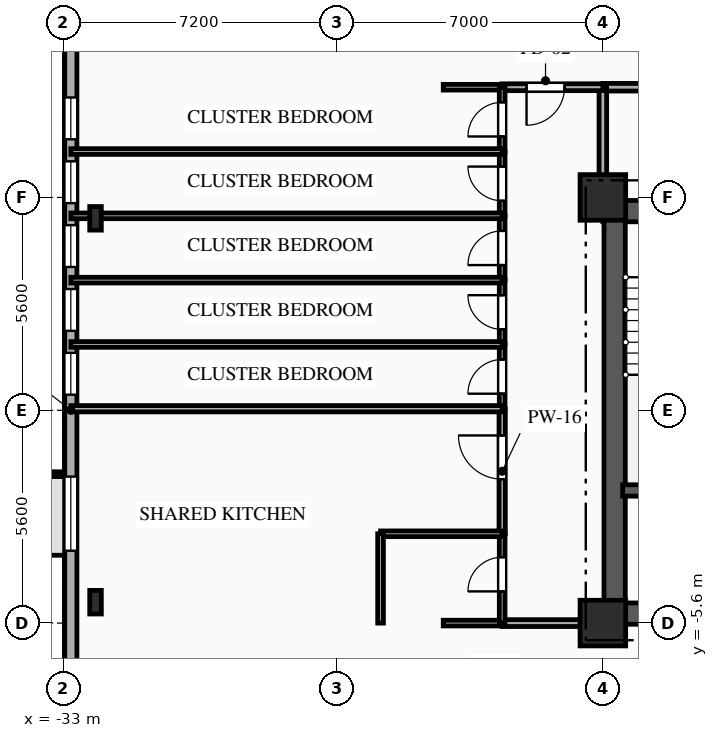
"""IFC4 building model, lengths in metres.
Left out: names, types, materials, properties, quantities, classifications, styles, units other than length and angle.
Written with IfcOpenShell. Run it as: python <this file> out.ifc"""

import sys

from ifc_helpers import new_model, si_unit, direction, frame, frame_2d, origin, origin_2d, place, context, subcontext, project, spatial, rectangle, i_section, extrude, element, fill, save


model = new_model("IFC4")
c1 = context("Model", 3, precision=1e-05, world=origin(), true_north=direction((0.0, 1.0)))
c2 = subcontext(c1, "Body", "Model", "MODEL_VIEW")
j1 = project(units=[si_unit("LENGTHUNIT", "METRE"), si_unit("PLANEANGLEUNIT", "RADIAN")], contexts=[c1])
p1 = place(None, origin())
s1 = spatial("IfcSite", under=j1, at=p1, CompositionType="ELEMENT")
p2 = place(p1, origin())
s2 = spatial("IfcBuilding", under=s1, at=p2, CompositionType="ELEMENT")
p3 = place(p2, frame((0.0, 0.0, 37.05)))
s3 = spatial("IfcBuildingStorey", under=s2, at=p3, CompositionType="ELEMENT", Elevation=37.05)
for number, where, z_axis, x_axis in (
    (1, (-18.8, -5.6, 0.0), (0.0, 0.0, 1.0), (1.0, 0.0, 0.0)),
    (2, (-18.8, 5.6, 0.0), (0.0, 0.0, 1.0), (1.0, 0.0, 0.0)),
):
    element("IfcColumn", number, at=place(p3, frame(where, z_axis=z_axis, x_axis=x_axis)), inside=s3, PredefinedType="COLUMN", context=c2, shape_type="SweptSolid", body=[
        extrude(rectangle(XDim=1.2, YDim=1.2, at=origin_2d()), origin(), (0.0, 0.0, 1.0), 3.35),
    ])
for number, where, z_axis, x_axis in (
    (3, (-32.15, 5.05, 0.0), (0.0, 0.0, 1.0), (1.0, 0.0, 0.0)),
    (4, (-32.15, -5.05, 0.0), (0.0, 0.0, 1.0), (1.0, 0.0, 0.0)),
):
    element("IfcColumn", number, at=place(p3, frame(where, z_axis=z_axis, x_axis=x_axis)), inside=s3, PredefinedType="COLUMN", context=c2, shape_type="SweptSolid", body=[
        extrude(i_section(OverallWidth=0.305, OverallDepth=0.62, WebThickness=0.021, FlangeThickness=0.04, FilletRadius=0.027, at=origin_2d()), origin(), (0.0, 0.0, 1.0), 3.35),
    ])
p4 = place(p3, frame((-32.8, -15.8, 0.0), z_axis=(0.0, 0.0, 1.0), x_axis=(0.0, 1.0, 0.0)))
e5 = element("IfcWall", 5, at=p4, inside=s3, PredefinedType="SOLIDWALL", context=c2, shape_type="SweptSolid", body=[
    extrude(rectangle(XDim=31.6, YDim=0.32, at=frame_2d((15.8, 0.0))), origin(), (0.0, 0.0, 1.0), 3.035),
])
p5 = place(p4, frame((12.105, 0.0, 0.85)))
e6 = element("IfcOpeningElement", 6, at=p5, cuts=e5, PredefinedType="OPENING", context=c2, shape_type="SweptSolid", body=[
    extrude(rectangle(XDim=1.95, YDim=1.85, at=frame_2d((0.975, 0.925))), frame((0.0, 0.17, 0.0), z_axis=(0.0, -1.0, 0.0), x_axis=(1.0, 0.0, 0.0)), (0.0, 0.0, 1.0), 0.34),
])
p6 = place(p4, frame((16.21, 0.0, 0.85)))
e7 = element("IfcOpeningElement", 7, at=p6, cuts=e5, PredefinedType="OPENING", context=c2, shape_type="SweptSolid", body=[
    extrude(rectangle(XDim=1.1, YDim=1.85, at=frame_2d((0.55, 0.925))), frame((0.0, 0.17, 0.0), z_axis=(0.0, -1.0, 0.0), x_axis=(1.0, 0.0, 0.0)), (0.0, 0.0, 1.0), 0.34),
])
p7 = place(p4, frame((17.89, 0.0, 0.85)))
e8 = element("IfcOpeningElement", 8, at=p7, cuts=e5, PredefinedType="OPENING", context=c2, shape_type="SweptSolid", body=[
    extrude(rectangle(XDim=1.1, YDim=1.85, at=frame_2d((0.55, 0.925))), frame((0.0, 0.17, 0.0), z_axis=(0.0, -1.0, 0.0), x_axis=(1.0, 0.0, 0.0)), (0.0, 0.0, 1.0), 0.34),
])
p8 = place(p4, frame((19.57, 0.0, 0.85)))
e9 = element("IfcOpeningElement", 9, at=p8, cuts=e5, PredefinedType="OPENING", context=c2, shape_type="SweptSolid", body=[
    extrude(rectangle(XDim=1.1, YDim=1.85, at=frame_2d((0.55, 0.925))), frame((0.0, 0.17, 0.0), z_axis=(0.0, -1.0, 0.0), x_axis=(1.0, 0.0, 0.0)), (0.0, 0.0, 1.0), 0.34),
])
p9 = place(p4, frame((21.25, 0.0, 0.85)))
e10 = element("IfcOpeningElement", 10, at=p9, cuts=e5, PredefinedType="OPENING", context=c2, shape_type="SweptSolid", body=[
    extrude(rectangle(XDim=1.1, YDim=1.85, at=frame_2d((0.55, 0.925))), frame((0.0, 0.17, 0.0), z_axis=(0.0, -1.0, 0.0), x_axis=(1.0, 0.0, 0.0)), (0.0, 0.0, 1.0), 0.34),
])
p10 = place(p4, frame((22.93, 0.0, 0.85)))
e11 = element("IfcOpeningElement", 11, at=p10, cuts=e5, PredefinedType="OPENING", context=c2, shape_type="SweptSolid", body=[
    extrude(rectangle(XDim=1.1, YDim=1.85, at=frame_2d((0.55, 0.925))), frame((0.0, 0.17, 0.0), z_axis=(0.0, -1.0, 0.0), x_axis=(1.0, 0.0, 0.0)), (0.0, 0.0, 1.0), 0.34),
])
p11 = place(p3, frame((-18.8, 5.24, 0.0), z_axis=(0.0, 0.0, 1.0), x_axis=(1.0, 0.0, 0.0)))
e12 = element("IfcWall", 12, at=p11, inside=s3, PredefinedType="SHEAR", context=c2, shape_type="SweptSolid", body=[
    extrude(rectangle(XDim=9.6, YDim=0.56, at=frame_2d((4.8, 0.0))), origin(), (0.0, 0.0, 1.0), 3.035),
])
p12 = place(p11, frame((1.55, 0.0, 0.0)))
e13 = element("IfcOpeningElement", 13, at=p12, cuts=e12, PredefinedType="OPENING", context=c2, shape_type="SweptSolid", body=[
    extrude(rectangle(XDim=1.1, YDim=2.15, at=frame_2d((0.55, 1.075))), frame((0.0, 0.29, 0.0), z_axis=(0.0, -1.0, 0.0), x_axis=(1.0, 0.0, 0.0)), (0.0, 0.0, 1.0), 0.58),
])
p13 = place(p11, frame((4.775, 0.0, 0.0)))
e14 = element("IfcOpeningElement", 14, at=p13, cuts=e12, PredefinedType="OPENING", context=c2, shape_type="SweptSolid", body=[
    extrude(rectangle(XDim=1.05, YDim=2.1, at=frame_2d((0.525, 1.05))), frame((0.0, 0.29, 0.0), z_axis=(0.0, -1.0, 0.0), x_axis=(1.0, 0.0, 0.0)), (0.0, 0.0, 1.0), 0.58),
])
p14 = place(p3, frame((-18.8, -5.35, 0.0), z_axis=(0.0, 0.0, 1.0), x_axis=(1.0, 0.0, 0.0)))
e15 = element("IfcWall", 15, at=p14, inside=s3, PredefinedType="SHEAR", context=c2, shape_type="SweptSolid", body=[
    extrude(rectangle(XDim=9.6, YDim=0.56, at=frame_2d((4.8, 0.0))), origin(), (0.0, 0.0, 1.0), 3.035),
])
p15 = place(p14, frame((1.05, 0.0, 0.0)))
e16 = element("IfcOpeningElement", 16, at=p15, cuts=e15, PredefinedType="OPENING", context=c2, shape_type="SweptSolid", body=[
    extrude(rectangle(XDim=0.9, YDim=2.1, at=frame_2d((0.45, 1.05))), frame((0.0, 0.29, 0.0), z_axis=(0.0, -1.0, 0.0), x_axis=(1.0, 0.0, 0.0)), (0.0, 0.0, 1.0), 0.58),
])
p16 = place(p3, frame((-18.49, -5.05, 0.0), z_axis=(0.0, 0.0, 1.0), x_axis=(0.0, 1.0, 0.0)))
e17 = element("IfcWall", 17, at=p16, inside=s3, PredefinedType="SHEAR", context=c2, shape_type="SweptSolid", body=[
    extrude(rectangle(XDim=10.1, YDim=0.56, at=frame_2d((5.05, 0.0))), origin(), (0.0, 0.0, 1.0), 3.035),
])
p17 = place(p3, frame((-18.28, -2.11, 0.0), z_axis=(0.0, 0.0, 1.0), x_axis=(1.0, 0.0, 0.0)))
e18 = element("IfcWall", 18, at=p17, inside=s3, PredefinedType="SHEAR", context=c2, shape_type="SweptSolid", body=[
    extrude(rectangle(XDim=3.18, YDim=0.3, at=frame_2d((1.59, 0.0))), origin(), (0.0, 0.0, 1.0), 3.035),
])
p18 = place(p3, frame((-12.0, 8.5, 0.0), z_axis=(0.0, 0.0, 1.0), x_axis=(-1.0, 0.0, 0.0)))
e19 = element("IfcWall", 19, at=p18, inside=s3, PredefinedType="PARTITIONING", context=c2, shape_type="SweptSolid", body=[
    extrude(rectangle(XDim=6.8, YDim=0.2, at=frame_2d((3.4, 0.0))), origin(), (0.0, 0.0, 1.0), 3.035),
])
p19 = place(p18, frame((1.715, 0.0, 0.0)))
e20 = element("IfcOpeningElement", 20, at=p19, cuts=e19, PredefinedType="OPENING", context=c2, shape_type="SweptSolid", body=[
    extrude(rectangle(XDim=1.1, YDim=2.15, at=frame_2d((0.55, 1.075))), frame((0.0, 0.11, 0.0), z_axis=(0.0, -1.0, 0.0), x_axis=(1.0, 0.0, 0.0)), (0.0, 0.0, 1.0), 0.22),
])
p20 = place(p3, frame((-18.8, 8.5, 0.0), z_axis=(0.0, 0.0, 1.0), x_axis=(0.0, -1.0, 0.0)))
e21 = element("IfcWall", 21, at=p20, inside=s3, PredefinedType="PARTITIONING", context=c2, shape_type="SweptSolid", body=[
    extrude(rectangle(XDim=2.9, YDim=0.2, at=frame_2d((1.45, 0.0))), origin(), (0.0, 0.0, 1.0), 2.52),
])
p21 = place(p3, frame((-18.8, 8.5, 0.0), z_axis=(0.0, 0.0, 1.0), x_axis=(-1.0, 0.0, 0.0)))
e22 = element("IfcWall", 22, at=p21, inside=s3, PredefinedType="PARTITIONING", context=c2, shape_type="SweptSolid", body=[
    extrude(rectangle(XDim=2.65, YDim=0.18, at=frame_2d((1.325, 0.0))), origin(), (0.0, 0.0, 1.0), 3.035),
])
p22 = place(p21, frame((1.009, 0.0, 0.0)))
e23 = element("IfcOpeningElement", 23, at=p22, cuts=e22, PredefinedType="OPENING", context=c2, shape_type="SweptSolid", body=[
    extrude(rectangle(XDim=1.0, YDim=2.15, at=frame_2d((0.5, 1.075))), frame((0.0, 0.1, 0.0), z_axis=(0.0, -1.0, 0.0), x_axis=(1.0, 0.0, 0.0)), (0.0, 0.0, 1.0), 0.2),
])
p23 = place(p3, frame((-21.45, 8.5, 0.0), z_axis=(0.0, 0.0, 1.0), x_axis=(-1.0, 0.0, 0.0)))
e24 = element("IfcWall", 24, at=p23, inside=s3, PredefinedType="PARTITIONING", context=c2, shape_type="SweptSolid", body=[
    extrude(rectangle(XDim=1.55, YDim=0.15, at=frame_2d((0.775, 0.0))), origin(), (0.0, 0.0, 1.0), 3.035),
])
p24 = place(p3, frame((-21.45, -5.6, 0.0), z_axis=(0.0, 0.0, 1.0), x_axis=(1.0, 0.0, 0.0)))
e25 = element("IfcWall", 25, at=p24, inside=s3, PredefinedType="PARTITIONING", context=c2, shape_type="SweptSolid", body=[
    extrude(rectangle(XDim=2.65, YDim=0.18, at=frame_2d((1.325, 0.0))), origin(), (0.0, 0.0, 1.0), 3.035),
])
p25 = place(p3, frame((-23.0, -5.6, 0.0), z_axis=(0.0, 0.0, 1.0), x_axis=(1.0, 0.0, 0.0)))
e26 = element("IfcWall", 26, at=p25, inside=s3, PredefinedType="PLUMBINGWALL", context=c2, shape_type="SweptSolid", body=[
    extrude(rectangle(XDim=1.55, YDim=0.15, at=frame_2d((0.775, 0.0))), origin(), (0.0, 0.0, 1.0), 3.035),
])
p26 = place(p3, frame((-21.45, -5.6, 0.0), z_axis=(0.0, 0.0, 1.0), x_axis=(0.0, 1.0, 0.0)))
e27 = element("IfcWall", 27, at=p26, inside=s3, PredefinedType="PLUMBINGWALL", context=c2, shape_type="SweptSolid", body=[
    extrude(rectangle(XDim=2.35, YDim=0.15, at=frame_2d((1.175, 0.0))), origin(), (0.0, 0.0, 1.0), 3.035),
])
p27 = place(p26, frame((0.834, 0.0, 0.0)))
e28 = element("IfcOpeningElement", 28, at=p27, cuts=e27, PredefinedType="OPENING", context=c2, shape_type="SweptSolid", body=[
    extrude(rectangle(XDim=0.9, YDim=2.1, at=frame_2d((0.45, 1.05))), frame((0.0, 0.085, 0.0), z_axis=(0.0, -1.0, 0.0), x_axis=(1.0, 0.0, 0.0)), (0.0, 0.0, 1.0), 0.17),
])
p28 = place(p3, frame((-21.45, -3.25, 0.0), z_axis=(0.0, 0.0, 1.0), x_axis=(0.0, 1.0, 0.0)))
e29 = element("IfcWall", 29, at=p28, inside=s3, PredefinedType="PARTITIONING", context=c2, shape_type="SweptSolid", body=[
    extrude(rectangle(XDim=3.29, YDim=0.165, at=frame_2d((1.645, 0.0))), origin(), (0.0, 0.0, 1.0), 3.035),
])
p29 = place(p28, frame((1.438, 0.0, 0.0)))
e30 = element("IfcOpeningElement", 30, at=p29, cuts=e29, PredefinedType="OPENING", context=c2, shape_type="SweptSolid", body=[
    extrude(rectangle(XDim=1.15, YDim=2.15, at=frame_2d((0.575, 1.075))), frame((0.0, 0.093, 0.0), z_axis=(0.0, -1.0, 0.0), x_axis=(1.0, 0.0, 0.0)), (0.0, 0.0, 1.0), 0.185),
])
p30 = place(p3, frame((-21.45, 0.04, 0.0), z_axis=(0.0, 0.0, 1.0), x_axis=(0.0, 1.0, 0.0)))
e31 = element("IfcWall", 31, at=p30, inside=s3, PredefinedType="PARTITIONING", context=c2, shape_type="SweptSolid", body=[
    extrude(rectangle(XDim=1.692, YDim=0.15, at=frame_2d((0.846, 0.0))), origin(), (0.0, 0.0, 1.0), 3.035),
])
p31 = place(p30, frame((0.396, 0.0, 0.0)))
e32 = element("IfcOpeningElement", 32, at=p31, cuts=e31, PredefinedType="OPENING", context=c2, shape_type="SweptSolid", body=[
    extrude(rectangle(XDim=0.9, YDim=2.1, at=frame_2d((0.45, 1.05))), frame((0.0, 0.085, 0.0), z_axis=(0.0, -1.0, 0.0), x_axis=(1.0, 0.0, 0.0)), (0.0, 0.0, 1.0), 0.17),
])
p32 = place(p3, frame((-21.45, 1.732, 0.0), z_axis=(0.0, 0.0, 1.0), x_axis=(0.0, 1.0, 0.0)))
e33 = element("IfcWall", 33, at=p32, inside=s3, PredefinedType="PARTITIONING", context=c2, shape_type="SweptSolid", body=[
    extrude(rectangle(XDim=1.692, YDim=0.15, at=frame_2d((0.846, 0.0))), origin(), (0.0, 0.0, 1.0), 3.035),
])
p33 = place(p32, frame((0.396, 0.0, 0.0)))
e34 = element("IfcOpeningElement", 34, at=p33, cuts=e33, PredefinedType="OPENING", context=c2, shape_type="SweptSolid", body=[
    extrude(rectangle(XDim=0.9, YDim=2.1, at=frame_2d((0.45, 1.05))), frame((0.0, 0.085, 0.0), z_axis=(0.0, -1.0, 0.0), x_axis=(1.0, 0.0, 0.0)), (0.0, 0.0, 1.0), 0.17),
])
p34 = place(p3, frame((-21.45, 3.424, 0.0), z_axis=(0.0, 0.0, 1.0), x_axis=(0.0, 1.0, 0.0)))
e35 = element("IfcWall", 35, at=p34, inside=s3, PredefinedType="PARTITIONING", context=c2, shape_type="SweptSolid", body=[
    extrude(rectangle(XDim=1.692, YDim=0.15, at=frame_2d((0.846, 0.0))), origin(), (0.0, 0.0, 1.0), 3.035),
])
p35 = place(p34, frame((0.396, 0.0, 0.0)))
e36 = element("IfcOpeningElement", 36, at=p35, cuts=e35, PredefinedType="OPENING", context=c2, shape_type="SweptSolid", body=[
    extrude(rectangle(XDim=0.9, YDim=2.1, at=frame_2d((0.45, 1.05))), frame((0.0, 0.085, 0.0), z_axis=(0.0, -1.0, 0.0), x_axis=(1.0, 0.0, 0.0)), (0.0, 0.0, 1.0), 0.17),
])
p36 = place(p3, frame((-21.45, 5.116, 0.0), z_axis=(0.0, 0.0, 1.0), x_axis=(0.0, 1.0, 0.0)))
e37 = element("IfcWall", 37, at=p36, inside=s3, PredefinedType="PARTITIONING", context=c2, shape_type="SweptSolid", body=[
    extrude(rectangle(XDim=1.692, YDim=0.15, at=frame_2d((0.846, 0.0))), origin(), (0.0, 0.0, 1.0), 3.035),
])
p37 = place(p36, frame((0.396, 0.0, 0.0)))
e38 = element("IfcOpeningElement", 38, at=p37, cuts=e37, PredefinedType="OPENING", context=c2, shape_type="SweptSolid", body=[
    extrude(rectangle(XDim=0.9, YDim=2.1, at=frame_2d((0.45, 1.05))), frame((0.0, 0.085, 0.0), z_axis=(0.0, -1.0, 0.0), x_axis=(1.0, 0.0, 0.0)), (0.0, 0.0, 1.0), 0.17),
])
p38 = place(p3, frame((-21.45, 6.808, 0.0), z_axis=(0.0, 0.0, 1.0), x_axis=(0.0, 1.0, 0.0)))
e39 = element("IfcWall", 39, at=p38, inside=s3, PredefinedType="PARTITIONING", context=c2, shape_type="SweptSolid", body=[
    extrude(rectangle(XDim=1.692, YDim=0.15, at=frame_2d((0.846, 0.0))), origin(), (0.0, 0.0, 1.0), 3.035),
])
p39 = place(p38, frame((0.396, 0.0, 0.0)))
e40 = element("IfcOpeningElement", 40, at=p39, cuts=e39, PredefinedType="OPENING", context=c2, shape_type="SweptSolid", body=[
    extrude(rectangle(XDim=0.9, YDim=2.1, at=frame_2d((0.45, 1.05))), frame((0.0, 0.085, 0.0), z_axis=(0.0, -1.0, 0.0), x_axis=(1.0, 0.0, 0.0)), (0.0, 0.0, 1.0), 0.17),
])
p40 = place(p3, frame((-24.65, -3.25, 0.0), z_axis=(0.0, 0.0, 1.0), x_axis=(1.0, 0.0, 0.0)))
e41 = element("IfcWall", 41, at=p40, inside=s3, PredefinedType="PLUMBINGWALL", context=c2, shape_type="SweptSolid", body=[
    extrude(rectangle(XDim=3.2, YDim=0.15, at=frame_2d((1.6, 0.0))), origin(), (0.0, 0.0, 1.0), 2.52),
])
p41 = place(p3, frame((-24.65, -5.6, 0.0), z_axis=(0.0, 0.0, 1.0), x_axis=(0.0, 1.0, 0.0)))
e42 = element("IfcWall", 42, at=p41, inside=s3, PredefinedType="PLUMBINGWALL", context=c2, shape_type="SweptSolid", body=[
    extrude(rectangle(XDim=2.35, YDim=0.15, at=frame_2d((1.175, 0.0))), origin(), (0.0, 0.0, 1.0), 3.035),
])
p42 = place(p3, frame((-32.8, 0.04, 0.0), z_axis=(0.0, 0.0, 1.0), x_axis=(1.0, 0.0, 0.0)))
e43 = element("IfcWall", 43, at=p42, inside=s3, PredefinedType="PARTITIONING", context=c2, shape_type="SweptSolid", body=[
    extrude(rectangle(XDim=11.35, YDim=0.165, at=frame_2d((5.675, 0.0))), origin(), (0.0, 0.0, 1.0), 3.035),
])
p43 = place(p3, frame((-32.8, 1.732, 0.0), z_axis=(0.0, 0.0, 1.0), x_axis=(1.0, 0.0, 0.0)))
e44 = element("IfcWall", 44, at=p43, inside=s3, PredefinedType="PARTITIONING", context=c2, shape_type="SweptSolid", body=[
    extrude(rectangle(XDim=11.35, YDim=0.15, at=frame_2d((5.675, 0.0))), origin(), (0.0, 0.0, 1.0), 3.035),
])
for number, where, z_axis, x_axis in (
    (45, (-32.8, 3.424, 0.0), (0.0, 0.0, 1.0), (1.0, 0.0, 0.0)),
    (46, (-32.8, 5.116, 0.0), (0.0, 0.0, 1.0), (1.0, 0.0, 0.0)),
):
    element("IfcWall", number, at=place(p3, frame(where, z_axis=z_axis, x_axis=x_axis)), inside=s3, PredefinedType="PARTITIONING", context=c2, shape_type="SweptSolid", body=[
        extrude(rectangle(XDim=11.35, YDim=0.15, at=frame_2d((5.675, 0.0))), origin(), (0.0, 0.0, 1.0), 2.52),
    ])
p44 = place(p3, frame((-32.8, 6.808, 0.0), z_axis=(0.0, 0.0, 1.0), x_axis=(1.0, 0.0, 0.0)))
e47 = element("IfcWall", 47, at=p44, inside=s3, PredefinedType="PARTITIONING", context=c2, shape_type="SweptSolid", body=[
    extrude(rectangle(XDim=11.35, YDim=0.15, at=frame_2d((5.675, 0.0))), origin(), (0.0, 0.0, 1.0), 3.035),
])
p45 = place(p5, origin())
e48 = element("IfcWindow", 48, at=p45, inside=s3, PartitioningType="SINGLE_PANEL", PredefinedType="WINDOW", context=c2, shape_type="SweptSolid", body=[
    extrude(rectangle(XDim=1.95, YDim=1.85, at=frame_2d((0.975, 0.925))), frame((0.0, 0.03, 0.0), z_axis=(0.0, -1.0, 0.0), x_axis=(1.0, 0.0, 0.0)), (0.0, 0.0, 1.0), 0.06),
])
fill(e6, e48)
p46 = place(p6, origin())
e49 = element("IfcWindow", 49, at=p46, inside=s3, PartitioningType="SINGLE_PANEL", PredefinedType="WINDOW", context=c2, shape_type="SweptSolid", body=[
    extrude(rectangle(XDim=1.1, YDim=1.85, at=frame_2d((0.55, 0.925))), frame((0.0, 0.03, 0.0), z_axis=(0.0, -1.0, 0.0), x_axis=(1.0, 0.0, 0.0)), (0.0, 0.0, 1.0), 0.06),
])
fill(e7, e49)
p47 = place(p7, origin())
e50 = element("IfcWindow", 50, at=p47, inside=s3, PartitioningType="SINGLE_PANEL", PredefinedType="WINDOW", context=c2, shape_type="SweptSolid", body=[
    extrude(rectangle(XDim=1.1, YDim=1.85, at=frame_2d((0.55, 0.925))), frame((0.0, 0.03, 0.0), z_axis=(0.0, -1.0, 0.0), x_axis=(1.0, 0.0, 0.0)), (0.0, 0.0, 1.0), 0.06),
])
fill(e8, e50)
p48 = place(p8, origin())
e51 = element("IfcWindow", 51, at=p48, inside=s3, PartitioningType="SINGLE_PANEL", PredefinedType="WINDOW", context=c2, shape_type="SweptSolid", body=[
    extrude(rectangle(XDim=1.1, YDim=1.85, at=frame_2d((0.55, 0.925))), frame((0.0, 0.03, 0.0), z_axis=(0.0, -1.0, 0.0), x_axis=(1.0, 0.0, 0.0)), (0.0, 0.0, 1.0), 0.06),
])
fill(e9, e51)
p49 = place(p9, origin())
e52 = element("IfcWindow", 52, at=p49, inside=s3, PartitioningType="SINGLE_PANEL", PredefinedType="WINDOW", context=c2, shape_type="SweptSolid", body=[
    extrude(rectangle(XDim=1.1, YDim=1.85, at=frame_2d((0.55, 0.925))), frame((0.0, 0.03, 0.0), z_axis=(0.0, -1.0, 0.0), x_axis=(1.0, 0.0, 0.0)), (0.0, 0.0, 1.0), 0.06),
])
fill(e10, e52)
p50 = place(p10, origin())
e53 = element("IfcWindow", 53, at=p50, inside=s3, PartitioningType="SINGLE_PANEL", PredefinedType="WINDOW", context=c2, shape_type="SweptSolid", body=[
    extrude(rectangle(XDim=1.1, YDim=1.85, at=frame_2d((0.55, 0.925))), frame((0.0, 0.03, 0.0), z_axis=(0.0, -1.0, 0.0), x_axis=(1.0, 0.0, 0.0)), (0.0, 0.0, 1.0), 0.06),
])
fill(e11, e53)
p51 = place(p22, origin())
e54 = element("IfcDoor", 54, at=p51, inside=s3, OperationType="SINGLE_SWING_RIGHT", PredefinedType="DOOR", context=c2, shape_type="SweptSolid", body=[
    extrude(rectangle(XDim=1.0, YDim=2.15, at=frame_2d((0.5, 1.075))), frame((0.0, 0.025, 0.0), z_axis=(0.0, -1.0, 0.0), x_axis=(1.0, 0.0, 0.0)), (0.0, 0.0, 1.0), 0.05),
])
fill(e23, e54)
p52 = place(p27, origin())
e55 = element("IfcDoor", 55, at=p52, inside=s3, OperationType="SINGLE_SWING_LEFT", PredefinedType="DOOR", context=c2, shape_type="SweptSolid", body=[
    extrude(rectangle(XDim=0.9, YDim=2.1, at=frame_2d((0.45, 1.05))), frame((0.0, 0.025, 0.0), z_axis=(0.0, -1.0, 0.0), x_axis=(1.0, 0.0, 0.0)), (0.0, 0.0, 1.0), 0.05),
])
fill(e28, e55)
p53 = place(p29, origin())
e56 = element("IfcDoor", 56, at=p53, inside=s3, OperationType="SINGLE_SWING_RIGHT", PredefinedType="DOOR", context=c2, shape_type="SweptSolid", body=[
    extrude(rectangle(XDim=1.15, YDim=2.15, at=frame_2d((0.575, 1.075))), frame((0.0, 0.025, 0.0), z_axis=(0.0, -1.0, 0.0), x_axis=(1.0, 0.0, 0.0)), (0.0, 0.0, 1.0), 0.05),
])
fill(e30, e56)
p54 = place(p31, origin())
e57 = element("IfcDoor", 57, at=p54, inside=s3, OperationType="SINGLE_SWING_LEFT", PredefinedType="DOOR", context=c2, shape_type="SweptSolid", body=[
    extrude(rectangle(XDim=0.9, YDim=2.1, at=frame_2d((0.45, 1.05))), frame((0.0, 0.025, 0.0), z_axis=(0.0, -1.0, 0.0), x_axis=(1.0, 0.0, 0.0)), (0.0, 0.0, 1.0), 0.05),
])
fill(e32, e57)
p55 = place(p33, origin())
e58 = element("IfcDoor", 58, at=p55, inside=s3, OperationType="SINGLE_SWING_RIGHT", PredefinedType="DOOR", context=c2, shape_type="SweptSolid", body=[
    extrude(rectangle(XDim=0.9, YDim=2.1, at=frame_2d((0.45, 1.05))), frame((0.0, 0.025, 0.0), z_axis=(0.0, -1.0, 0.0), x_axis=(1.0, 0.0, 0.0)), (0.0, 0.0, 1.0), 0.05),
])
fill(e34, e58)
p56 = place(p35, origin())
e59 = element("IfcDoor", 59, at=p56, inside=s3, OperationType="SINGLE_SWING_LEFT", PredefinedType="DOOR", context=c2, shape_type="SweptSolid", body=[
    extrude(rectangle(XDim=0.9, YDim=2.1, at=frame_2d((0.45, 1.05))), frame((0.0, 0.025, 0.0), z_axis=(0.0, -1.0, 0.0), x_axis=(1.0, 0.0, 0.0)), (0.0, 0.0, 1.0), 0.05),
])
fill(e36, e59)
p57 = place(p37, origin())
e60 = element("IfcDoor", 60, at=p57, inside=s3, OperationType="SINGLE_SWING_RIGHT", PredefinedType="DOOR", context=c2, shape_type="SweptSolid", body=[
    extrude(rectangle(XDim=0.9, YDim=2.1, at=frame_2d((0.45, 1.05))), frame((0.0, 0.025, 0.0), z_axis=(0.0, -1.0, 0.0), x_axis=(1.0, 0.0, 0.0)), (0.0, 0.0, 1.0), 0.05),
])
fill(e38, e60)
p58 = place(p39, origin())
e61 = element("IfcDoor", 61, at=p58, inside=s3, OperationType="SINGLE_SWING_LEFT", PredefinedType="DOOR", context=c2, shape_type="SweptSolid", body=[
    extrude(rectangle(XDim=0.9, YDim=2.1, at=frame_2d((0.45, 1.05))), frame((0.0, 0.025, 0.0), z_axis=(0.0, -1.0, 0.0), x_axis=(1.0, 0.0, 0.0)), (0.0, 0.0, 1.0), 0.05),
])
fill(e40, e61)
save(model, sys.argv[1])
